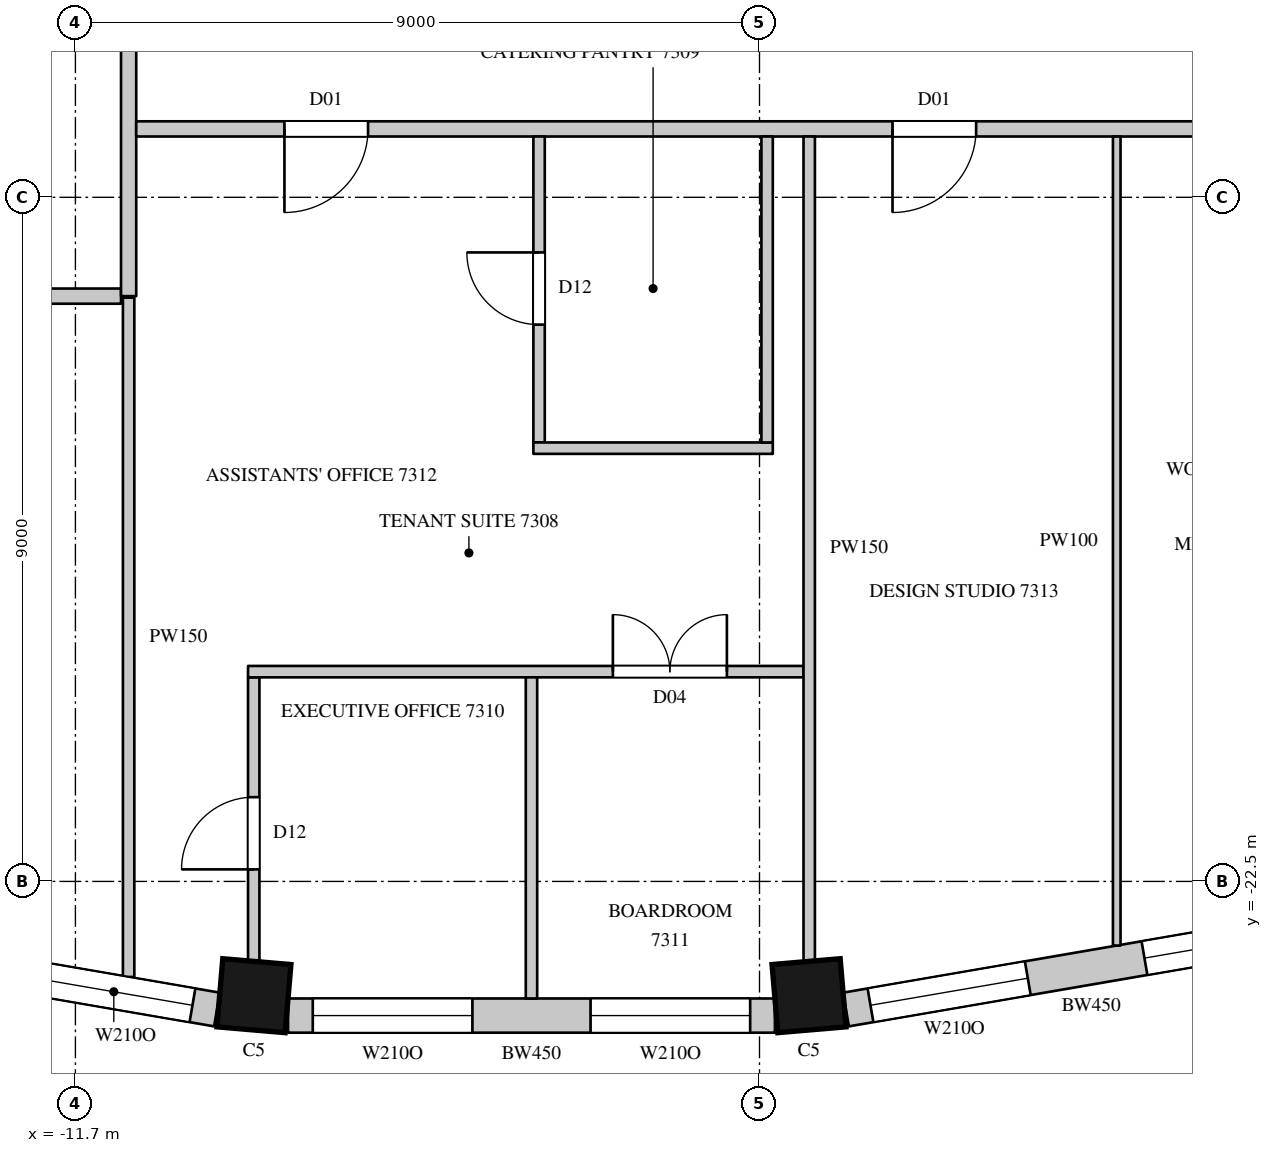
"""IFC4 building model, lengths in metres.
Left out: names, types, materials, properties, quantities, classifications, styles, units other than length and angle.
Written with IfcOpenShell. Run it as: python <this file> out.ifc"""

import sys

from ifc_helpers import new_model, si_unit, direction, frame, frame_2d, origin, origin_2d, place, context, subcontext, project, spatial, rectangle, extrude, element, fill, save


model = new_model("IFC4")
c1 = context("Model", 3, precision=1e-05, world=origin(), true_north=direction((0.0, 1.0)))
c2 = subcontext(c1, "Body", "Model", "MODEL_VIEW")
j1 = project(units=[si_unit("LENGTHUNIT", "METRE"), si_unit("PLANEANGLEUNIT", "RADIAN")], contexts=[c1])
p1 = place(None, origin())
s1 = spatial("IfcSite", under=j1, at=p1, CompositionType="ELEMENT")
p2 = place(p1, origin())
s2 = spatial("IfcBuilding", under=s1, at=p2, CompositionType="ELEMENT")
p3 = place(p2, frame((0.0, 0.0, 321.3)))
s3 = spatial("IfcBuildingStorey", under=s2, at=p3, CompositionType="ELEMENT", Elevation=321.3)
for number, where, z_axis, x_axis in (
    (1, (-9.351, -24.003, 0.0), (0.0, 0.0, 1.0), (0.996, -0.085, 0.0)),
    (2, (-2.049, -24.003, 0.0), (0.0, 0.0, 1.0), (0.996, 0.085, 0.0)),
):
    element("IfcColumn", number, at=place(p3, frame(where, z_axis=z_axis, x_axis=x_axis)), inside=s3, PredefinedType="COLUMN", context=c2, shape_type="SweptSolid", body=[
        extrude(rectangle(XDim=0.9, YDim=0.9, at=origin_2d()), origin(), (0.0, 0.0, 1.0), 4.1),
    ])
p4 = place(p3, frame((-16.157, -23.097, 0.0), z_axis=(0.0, 0.0, 1.0), x_axis=(0.985502073964, -0.169663379113, 0.0)))
e3 = element("IfcWall", 3, at=p4, inside=s3, PredefinedType="SOLIDWALL", context=c2, shape_type="SweptSolid", body=[
    extrude(rectangle(XDim=6.412, YDim=0.45, at=frame_2d((3.206, 0.0))), origin(), (0.0, 0.0, 1.0), 3.8),
])
p5 = place(p4, frame((0.327, 0.0, 1.05)))
e4 = element("IfcOpeningElement", 4, at=p5, cuts=e3, PredefinedType="OPENING", context=c2, shape_type="SweptSolid", body=[
    extrude(rectangle(XDim=2.1, YDim=2.4, at=frame_2d((1.05, 1.2))), frame((0.0, 0.235, 0.0), z_axis=(0.0, -1.0, 0.0), x_axis=(1.0, 0.0, 0.0)), (0.0, 0.0, 1.0), 0.47),
])
p6 = place(p4, frame((3.985, 0.0, 1.05)))
e5 = element("IfcOpeningElement", 5, at=p6, cuts=e3, PredefinedType="OPENING", context=c2, shape_type="SweptSolid", body=[
    extrude(rectangle(XDim=2.1, YDim=2.4, at=frame_2d((1.05, 1.2))), frame((0.0, 0.235, 0.0), z_axis=(0.0, -1.0, 0.0), x_axis=(1.0, 0.0, 0.0)), (0.0, 0.0, 1.0), 0.47),
])
p7 = place(p3, frame((-8.903, -24.265, 0.0), z_axis=(0.0, 0.0, 1.0), x_axis=(1.0, 0.0, 0.0)))
e6 = element("IfcWall", 6, at=p7, inside=s3, PredefinedType="SOLIDWALL", context=c2, shape_type="SweptSolid", body=[
    extrude(rectangle(XDim=6.406, YDim=0.45, at=frame_2d((3.203, 0.0))), origin(), (0.0, 0.0, 1.0), 3.8),
])
p8 = place(p7, frame((0.325, 0.0, 1.05)))
e7 = element("IfcOpeningElement", 7, at=p8, cuts=e6, PredefinedType="OPENING", context=c2, shape_type="SweptSolid", body=[
    extrude(rectangle(XDim=2.1, YDim=2.4, at=frame_2d((1.05, 1.2))), frame((0.0, 0.235, 0.0), z_axis=(0.0, -1.0, 0.0), x_axis=(1.0, 0.0, 0.0)), (0.0, 0.0, 1.0), 0.47),
])
p9 = place(p7, frame((3.98, 0.0, 1.05)))
e8 = element("IfcOpeningElement", 8, at=p9, cuts=e6, PredefinedType="OPENING", context=c2, shape_type="SweptSolid", body=[
    extrude(rectangle(XDim=2.1, YDim=2.4, at=frame_2d((1.05, 1.2))), frame((0.0, 0.235, 0.0), z_axis=(0.0, -1.0, 0.0), x_axis=(1.0, 0.0, 0.0)), (0.0, 0.0, 1.0), 0.47),
])
p10 = place(p3, frame((-1.562, -24.185, 0.0), z_axis=(0.0, 0.0, 1.0), x_axis=(0.985502073964, 0.169663379113, 0.0)))
e9 = element("IfcWall", 9, at=p10, inside=s3, PredefinedType="SOLIDWALL", context=c2, shape_type="SweptSolid", body=[
    extrude(rectangle(XDim=6.412, YDim=0.45, at=frame_2d((3.206, 0.0))), origin(), (0.0, 0.0, 1.0), 3.8),
])
p11 = place(p10, frame((0.327, 0.0, 1.05)))
e10 = element("IfcOpeningElement", 10, at=p11, cuts=e9, PredefinedType="OPENING", context=c2, shape_type="SweptSolid", body=[
    extrude(rectangle(XDim=2.1, YDim=2.4, at=frame_2d((1.05, 1.2))), frame((0.0, 0.235, 0.0), z_axis=(0.0, -1.0, 0.0), x_axis=(1.0, 0.0, 0.0)), (0.0, 0.0, 1.0), 0.47),
])
p12 = place(p10, frame((3.985, 0.0, 1.05)))
e11 = element("IfcOpeningElement", 11, at=p12, cuts=e9, PredefinedType="OPENING", context=c2, shape_type="SweptSolid", body=[
    extrude(rectangle(XDim=2.1, YDim=2.4, at=frame_2d((1.05, 1.2))), frame((0.0, 0.235, 0.0), z_axis=(0.0, -1.0, 0.0), x_axis=(1.0, 0.0, 0.0)), (0.0, 0.0, 1.0), 0.47),
])
p13 = place(p3, frame((-13.97, -14.8, 0.0), z_axis=(0.0, 0.0, 1.0), x_axis=(1.0, 0.0, 0.0)))
e12 = element("IfcWall", 12, at=p13, inside=s3, PredefinedType="PARTITIONING", context=c2, shape_type="SweptSolid", body=[
    extrude(rectangle(XDim=2.87, YDim=0.2, at=frame_2d((1.435, 0.0))), origin(), (0.0, 0.0, 1.0), 3.8),
])
p14 = place(p3, frame((-11.0, -14.8, 0.0), z_axis=(0.0, 0.0, 1.0), x_axis=(0.0, 1.0, 0.0)))
e13 = element("IfcWall", 13, at=p14, inside=s3, PredefinedType="PARTITIONING", context=c2, shape_type="SweptSolid", body=[
    extrude(rectangle(XDim=29.5, YDim=0.2, at=frame_2d((14.75, 0.0))), origin(), (0.0, 0.0, 1.0), 3.8),
])
p15 = place(p14, frame((7.75, 0.0, 0.0)))
e14 = element("IfcOpeningElement", 14, at=p15, cuts=e13, PredefinedType="OPENING", context=c2, shape_type="SweptSolid", body=[
    extrude(rectangle(XDim=1.5, YDim=2.4, at=frame_2d((0.75, 1.2))), frame((0.0, 0.11, 0.0), z_axis=(0.0, -1.0, 0.0), x_axis=(1.0, 0.0, 0.0)), (0.0, 0.0, 1.0), 0.22),
])
p16 = place(p3, frame((-10.9, -12.6, 0.0), z_axis=(0.0, 0.0, 1.0), x_axis=(1.0, 0.0, 0.0)))
e15 = element("IfcWall", 15, at=p16, inside=s3, PredefinedType="PARTITIONING", context=c2, shape_type="SweptSolid", body=[
    extrude(rectangle(XDim=22.6, YDim=0.2, at=frame_2d((11.3, 0.0))), origin(), (0.0, 0.0, 1.0), 3.8),
])
p17 = place(p16, frame((14.1, 0.0, 0.0)))
e16 = element("IfcOpeningElement", 16, at=p17, cuts=e15, PredefinedType="OPENING", context=c2, shape_type="SweptSolid", body=[
    extrude(rectangle(XDim=0.9, YDim=2.2, at=frame_2d((0.45, 1.1))), frame((0.0, 0.11, 0.0), z_axis=(0.0, -1.0, 0.0), x_axis=(1.0, 0.0, 0.0)), (0.0, 0.0, 1.0), 0.22),
])
p18 = place(p16, frame((17.4, 0.0, 0.0)))
e17 = element("IfcOpeningElement", 17, at=p18, cuts=e15, PredefinedType="OPENING", context=c2, shape_type="SweptSolid", body=[
    extrude(rectangle(XDim=0.9, YDim=2.2, at=frame_2d((0.45, 1.1))), frame((0.0, 0.11, 0.0), z_axis=(0.0, -1.0, 0.0), x_axis=(1.0, 0.0, 0.0)), (0.0, 0.0, 1.0), 0.22),
])
p19 = place(p16, frame((20.25, 0.0, 0.0)))
e18 = element("IfcOpeningElement", 18, at=p19, cuts=e15, PredefinedType="OPENING", context=c2, shape_type="SweptSolid", body=[
    extrude(rectangle(XDim=0.9, YDim=2.2, at=frame_2d((0.45, 1.1))), frame((0.0, 0.11, 0.0), z_axis=(0.0, -1.0, 0.0), x_axis=(1.0, 0.0, 0.0)), (0.0, 0.0, 1.0), 0.22),
])
p20 = place(p16, frame((1.95, 0.0, 0.0)))
e19 = element("IfcOpeningElement", 19, at=p20, cuts=e15, PredefinedType="OPENING", context=c2, shape_type="SweptSolid", body=[
    extrude(rectangle(XDim=1.1, YDim=2.4, at=frame_2d((0.55, 1.2))), frame((0.0, 0.11, 0.0), z_axis=(0.0, -1.0, 0.0), x_axis=(1.0, 0.0, 0.0)), (0.0, 0.0, 1.0), 0.22),
])
p21 = place(p16, frame((9.95, 0.0, 0.0)))
e20 = element("IfcOpeningElement", 20, at=p21, cuts=e15, PredefinedType="OPENING", context=c2, shape_type="SweptSolid", body=[
    extrude(rectangle(XDim=1.1, YDim=2.4, at=frame_2d((0.55, 1.2))), frame((0.0, 0.11, 0.0), z_axis=(0.0, -1.0, 0.0), x_axis=(1.0, 0.0, 0.0)), (0.0, 0.0, 1.0), 0.22),
])
p22 = place(p3, frame((-11.0, -23.757, 0.0), z_axis=(0.0, 0.0, 1.0), x_axis=(0.0, 1.0, 0.0)))
e21 = element("IfcWall", 21, at=p22, inside=s3, PredefinedType="PARTITIONING", context=c2, shape_type="SweptSolid", body=[
    extrude(rectangle(XDim=8.937, YDim=0.15, at=frame_2d((4.468, 0.0))), origin(), (0.0, 0.0, 1.0), 3.8),
])
p23 = place(p3, frame((-9.354, -23.542, 0.0), z_axis=(0.0, 0.0, 1.0), x_axis=(0.0, 1.0, 0.0)))
e22 = element("IfcWall", 22, at=p23, inside=s3, PredefinedType="PARTITIONING", context=c2, shape_type="SweptSolid", body=[
    extrude(rectangle(XDim=3.727, YDim=0.15, at=frame_2d((1.863, 0.0))), origin(), (0.0, 0.0, 1.0), 3.8),
])
p24 = place(p23, frame((1.2, 0.0, 0.0)))
e23 = element("IfcOpeningElement", 23, at=p24, cuts=e22, PredefinedType="OPENING", context=c2, shape_type="SweptSolid", body=[
    extrude(rectangle(XDim=0.95, YDim=2.2, at=frame_2d((0.475, 1.1))), frame((0.0, 0.085, 0.0), z_axis=(0.0, -1.0, 0.0), x_axis=(1.0, 0.0, 0.0)), (0.0, 0.0, 1.0), 0.17),
])
p25 = place(p3, frame((-9.429, -19.74, 0.0), z_axis=(0.0, 0.0, 1.0), x_axis=(1.0, 0.0, 0.0)))
e24 = element("IfcWall", 24, at=p25, inside=s3, PredefinedType="PARTITIONING", context=c2, shape_type="SweptSolid", body=[
    extrude(rectangle(XDim=7.308, YDim=0.15, at=frame_2d((3.654, 0.0))), origin(), (0.0, 0.0, 1.0), 3.8),
])
p26 = place(p25, frame((4.8, 0.0, 0.0)))
e25 = element("IfcOpeningElement", 25, at=p26, cuts=e24, PredefinedType="OPENING", context=c2, shape_type="SweptSolid", body=[
    extrude(rectangle(XDim=1.5, YDim=2.2, at=frame_2d((0.75, 1.1))), frame((0.0, 0.085, 0.0), z_axis=(0.0, -1.0, 0.0), x_axis=(1.0, 0.0, 0.0)), (0.0, 0.0, 1.0), 0.17),
])
p27 = place(p3, frame((-5.7, -24.04, 0.0), z_axis=(0.0, 0.0, 1.0), x_axis=(0.0, 1.0, 0.0)))
e26 = element("IfcWall", 26, at=p27, inside=s3, PredefinedType="PARTITIONING", context=c2, shape_type="SweptSolid", body=[
    extrude(rectangle(XDim=4.225, YDim=0.15, at=frame_2d((2.113, 0.0))), origin(), (0.0, 0.0, 1.0), 3.8),
])
p28 = place(p3, frame((-5.6, -16.725, 0.0), z_axis=(0.0, 0.0, 1.0), x_axis=(0.0, 1.0, 0.0)))
e27 = element("IfcWall", 27, at=p28, inside=s3, PredefinedType="PARTITIONING", context=c2, shape_type="SweptSolid", body=[
    extrude(rectangle(XDim=4.025, YDim=0.15, at=frame_2d((2.013, 0.0))), origin(), (0.0, 0.0, 1.0), 3.8),
])
p29 = place(p28, frame((1.55, 0.0, 0.0)))
e28 = element("IfcOpeningElement", 28, at=p29, cuts=e27, PredefinedType="OPENING", context=c2, shape_type="SweptSolid", body=[
    extrude(rectangle(XDim=0.95, YDim=2.2, at=frame_2d((0.475, 1.1))), frame((0.0, 0.085, 0.0), z_axis=(0.0, -1.0, 0.0), x_axis=(1.0, 0.0, 0.0)), (0.0, 0.0, 1.0), 0.17),
])
p30 = place(p3, frame((-5.675, -16.8, 0.0), z_axis=(0.0, 0.0, 1.0), x_axis=(1.0, 0.0, 0.0)))
e29 = element("IfcWall", 29, at=p30, inside=s3, PredefinedType="PARTITIONING", context=c2, shape_type="SweptSolid", body=[
    extrude(rectangle(XDim=3.15, YDim=0.15, at=frame_2d((1.575, 0.0))), origin(), (0.0, 0.0, 1.0), 3.8),
])
p31 = place(p3, frame((-2.6, -16.725, 0.0), z_axis=(0.0, 0.0, 1.0), x_axis=(0.0, 1.0, 0.0)))
e30 = element("IfcWall", 30, at=p31, inside=s3, PredefinedType="PARTITIONING", context=c2, shape_type="SweptSolid", body=[
    extrude(rectangle(XDim=4.025, YDim=0.15, at=frame_2d((2.013, 0.0))), origin(), (0.0, 0.0, 1.0), 3.8),
])
p32 = place(p3, frame((-2.046, -23.542, 0.0), z_axis=(0.0, 0.0, 1.0), x_axis=(0.0, 1.0, 0.0)))
e31 = element("IfcWall", 31, at=p32, inside=s3, PredefinedType="PARTITIONING", context=c2, shape_type="SweptSolid", body=[
    extrude(rectangle(XDim=10.842, YDim=0.15, at=frame_2d((5.421, 0.0))), origin(), (0.0, 0.0, 1.0), 3.8),
])
p33 = place(p3, frame((2.0, -23.344, 0.0), z_axis=(0.0, 0.0, 1.0), x_axis=(0.0, 1.0, 0.0)))
e32 = element("IfcWall", 32, at=p33, inside=s3, PredefinedType="PARTITIONING", context=c2, shape_type="SweptSolid", body=[
    extrude(rectangle(XDim=10.644, YDim=0.1, at=frame_2d((5.322, 0.0))), origin(), (0.0, 0.0, 1.0), 3.8),
])
p34 = place(p6, origin())
e33 = element("IfcWindow", 33, at=p34, inside=s3, PartitioningType="SINGLE_PANEL", PredefinedType="WINDOW", context=c2, shape_type="SweptSolid", body=[
    extrude(rectangle(XDim=2.1, YDim=2.4, at=frame_2d((1.05, 1.2))), frame((0.0, 0.135, 0.0), z_axis=(0.0, -1.0, 0.0), x_axis=(1.0, 0.0, 0.0)), (0.0, 0.0, 1.0), 0.06),
])
fill(e5, e33)
p35 = place(p8, origin())
e34 = element("IfcWindow", 34, at=p35, inside=s3, PartitioningType="SINGLE_PANEL", PredefinedType="WINDOW", context=c2, shape_type="SweptSolid", body=[
    extrude(rectangle(XDim=2.1, YDim=2.4, at=frame_2d((1.05, 1.2))), frame((0.0, 0.135, 0.0), z_axis=(0.0, -1.0, 0.0), x_axis=(1.0, 0.0, 0.0)), (0.0, 0.0, 1.0), 0.06),
])
fill(e7, e34)
p36 = place(p9, origin())
e35 = element("IfcWindow", 35, at=p36, inside=s3, PartitioningType="SINGLE_PANEL", PredefinedType="WINDOW", context=c2, shape_type="SweptSolid", body=[
    extrude(rectangle(XDim=2.1, YDim=2.4, at=frame_2d((1.05, 1.2))), frame((0.0, 0.135, 0.0), z_axis=(0.0, -1.0, 0.0), x_axis=(1.0, 0.0, 0.0)), (0.0, 0.0, 1.0), 0.06),
])
fill(e8, e35)
p37 = place(p11, origin())
e36 = element("IfcWindow", 36, at=p37, inside=s3, PartitioningType="SINGLE_PANEL", PredefinedType="WINDOW", context=c2, shape_type="SweptSolid", body=[
    extrude(rectangle(XDim=2.1, YDim=2.4, at=frame_2d((1.05, 1.2))), frame((0.0, 0.135, 0.0), z_axis=(0.0, -1.0, 0.0), x_axis=(1.0, 0.0, 0.0)), (0.0, 0.0, 1.0), 0.06),
])
fill(e10, e36)
p38 = place(p12, origin())
e37 = element("IfcWindow", 37, at=p38, inside=s3, PartitioningType="SINGLE_PANEL", PredefinedType="WINDOW", context=c2, shape_type="SweptSolid", body=[
    extrude(rectangle(XDim=2.1, YDim=2.4, at=frame_2d((1.05, 1.2))), frame((0.0, 0.135, 0.0), z_axis=(0.0, -1.0, 0.0), x_axis=(1.0, 0.0, 0.0)), (0.0, 0.0, 1.0), 0.06),
])
fill(e11, e37)
p39 = place(p20, origin())
e38 = element("IfcDoor", 38, at=p39, inside=s3, OperationType="SINGLE_SWING_RIGHT", PredefinedType="DOOR", context=c2, shape_type="SweptSolid", body=[
    extrude(rectangle(XDim=1.1, YDim=2.4, at=frame_2d((0.55, 1.2))), frame((0.0, 0.025, 0.0), z_axis=(0.0, -1.0, 0.0), x_axis=(1.0, 0.0, 0.0)), (0.0, 0.0, 1.0), 0.05),
])
fill(e19, e38)
p40 = place(p29, origin())
e39 = element("IfcDoor", 39, at=p40, inside=s3, OperationType="SINGLE_SWING_RIGHT", PredefinedType="DOOR", context=c2, shape_type="SweptSolid", body=[
    extrude(rectangle(XDim=0.95, YDim=2.2, at=frame_2d((0.475, 1.1))), frame((0.0, 0.025, 0.0), z_axis=(0.0, -1.0, 0.0), x_axis=(1.0, 0.0, 0.0)), (0.0, 0.0, 1.0), 0.05),
])
fill(e28, e39)
p41 = place(p24, origin())
e40 = element("IfcDoor", 40, at=p41, inside=s3, OperationType="SINGLE_SWING_LEFT", PredefinedType="DOOR", context=c2, shape_type="SweptSolid", body=[
    extrude(rectangle(XDim=0.95, YDim=2.2, at=frame_2d((0.475, 1.1))), frame((0.0, 0.025, 0.0), z_axis=(0.0, -1.0, 0.0), x_axis=(1.0, 0.0, 0.0)), (0.0, 0.0, 1.0), 0.05),
])
fill(e23, e40)
p42 = place(p26, origin())
e41 = element("IfcDoor", 41, at=p42, inside=s3, OperationType="DOUBLE_DOOR_SINGLE_SWING", PredefinedType="DOOR", context=c2, shape_type="SweptSolid", body=[
    extrude(rectangle(XDim=1.5, YDim=2.2, at=frame_2d((0.75, 1.1))), frame((0.0, 0.025, 0.0), z_axis=(0.0, -1.0, 0.0), x_axis=(1.0, 0.0, 0.0)), (0.0, 0.0, 1.0), 0.05),
])
fill(e25, e41)
p43 = place(p21, origin())
e42 = element("IfcDoor", 42, at=p43, inside=s3, OperationType="SINGLE_SWING_RIGHT", PredefinedType="DOOR", context=c2, shape_type="SweptSolid", body=[
    extrude(rectangle(XDim=1.1, YDim=2.4, at=frame_2d((0.55, 1.2))), frame((0.0, 0.025, 0.0), z_axis=(0.0, -1.0, 0.0), x_axis=(1.0, 0.0, 0.0)), (0.0, 0.0, 1.0), 0.05),
])
fill(e20, e42)
save(model, sys.argv[1])
